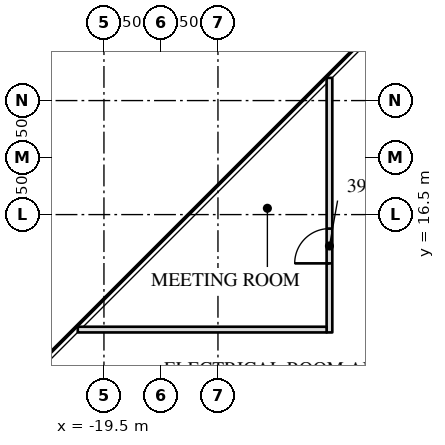
"""IFC4 building model, lengths in metres.
Left out: names, types, materials, properties, quantities, classifications, styles, units other than length and angle.
Written with IfcOpenShell. Run it as: python <this file> out.ifc"""

import sys

from ifc_helpers import new_model, si_unit, direction, frame, frame_2d, origin, place, context, subcontext, project, spatial, rectangle, extrude, element, fill, save


model = new_model("IFC4")
c1 = context("Model", 3, precision=1e-05, world=origin(), true_north=direction((0.0, 1.0)))
c2 = subcontext(c1, "Body", "Model", "MODEL_VIEW")
j1 = project(units=[si_unit("LENGTHUNIT", "METRE"), si_unit("PLANEANGLEUNIT", "RADIAN")], contexts=[c1])
p1 = place(None, origin())
s1 = spatial("IfcSite", under=j1, at=p1, CompositionType="ELEMENT")
p2 = place(p1, origin())
s2 = spatial("IfcBuilding", under=s1, at=p2, CompositionType="ELEMENT")
p3 = place(p2, frame((0.0, 0.0, 166.4)))
s3 = spatial("IfcBuildingStorey", under=s2, at=p3, CompositionType="ELEMENT", Elevation=166.4)
p4 = place(p3, frame((-13.566, 13.399, 0.0), z_axis=(0.0, 0.0, 1.0), x_axis=(0.0, 1.0, 0.0)))
e1 = element("IfcWall", 1, at=p4, inside=s3, PredefinedType="PARTITIONING", context=c2, shape_type="SweptSolid", body=[
    extrude(rectangle(XDim=6.698, YDim=0.15, at=frame_2d((3.349, 0.0))), origin(), (0.0, 0.0, 1.0), 3.91),
])
p5 = place(p4, frame((1.817, 0.0, 0.0)))
e2 = element("IfcOpeningElement", 2, at=p5, cuts=e1, PredefinedType="OPENING", context=c2, shape_type="SweptSolid", body=[
    extrude(rectangle(XDim=0.915, YDim=2.134, at=frame_2d((0.458, 1.067))), frame((0.0, 0.085, 0.0), z_axis=(0.0, -1.0, 0.0), x_axis=(1.0, 0.0, 0.0)), (0.0, 0.0, 1.0), 0.17),
])
p6 = place(p3, frame((-13.641, 13.474, 0.0), z_axis=(0.0, 0.0, 1.0), x_axis=(-1.0, 0.0, 0.0)))
e3 = element("IfcWall", 3, at=p6, inside=s3, PredefinedType="PARTITIONING", context=c2, shape_type="SweptSolid", body=[
    extrude(rectangle(XDim=6.548, YDim=0.15, at=frame_2d((3.274, 0.0))), origin(), (0.0, 0.0, 1.0), 3.91),
])
p7 = place(p5, origin())
e4 = element("IfcDoor", 4, at=p7, inside=s3, OperationType="SINGLE_SWING_LEFT", PredefinedType="DOOR", context=c2, shape_type="SweptSolid", body=[
    extrude(rectangle(XDim=0.915, YDim=2.134, at=frame_2d((0.458, 1.067))), frame((0.0, 0.025, 0.0), z_axis=(0.0, -1.0, 0.0), x_axis=(1.0, 0.0, 0.0)), (0.0, 0.0, 1.0), 0.05),
])
fill(e2, e4)
save(model, sys.argv[1])
